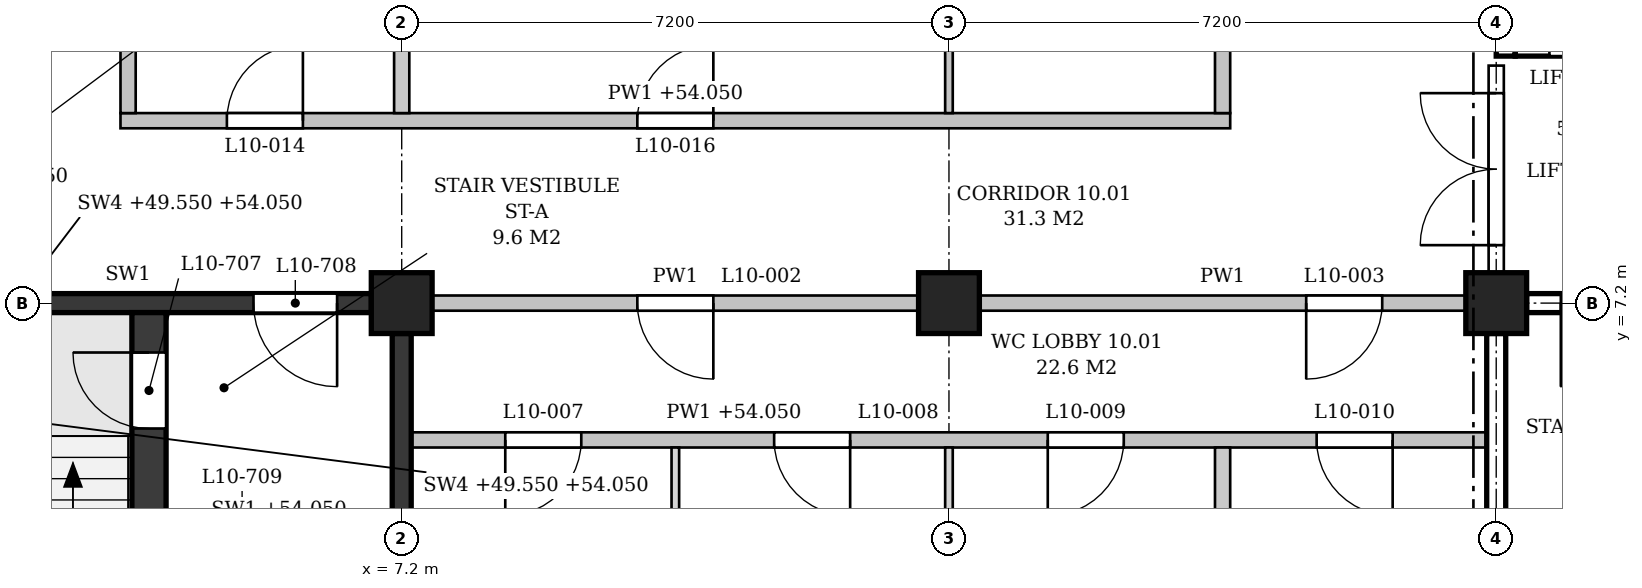
"""IFC4 building model, lengths in metres.
Left out: names, types, materials, properties, quantities, classifications, styles, units other than length and angle.
Written with IfcOpenShell. Run it as: python <this file> out.ifc"""

import sys

from ifc_helpers import new_model, si_unit, direction, frame, frame_2d, origin, origin_2d, place, context, subcontext, project, spatial, polyline, rectangle, outline, extrude, element, fill, save


model = new_model("IFC4")
c1 = context("Model", 3, precision=1e-05, world=origin(), true_north=direction((0.0, 1.0)))
c2 = subcontext(c1, "Body", "Model", "MODEL_VIEW")
j1 = project(units=[si_unit("LENGTHUNIT", "METRE"), si_unit("PLANEANGLEUNIT", "RADIAN")], contexts=[c1])
p1 = place(None, origin())
s1 = spatial("IfcSite", under=j1, at=p1, CompositionType="ELEMENT")
p2 = place(p1, origin())
s2 = spatial("IfcBuilding", under=s1, at=p2, CompositionType="ELEMENT")
p3 = place(p2, frame((0.0, 0.0, 49.8)))
s3 = spatial("IfcBuildingStorey", under=s2, at=p3, CompositionType="ELEMENT", Elevation=49.8)
for number, where, z_axis, x_axis in (
    (1, (7.2, 7.2, 0.0), (0.0, 0.0, 1.0), (1.0, 0.0, 0.0)),
    (2, (14.4, 7.2, 0.0), (0.0, 0.0, 1.0), (1.0, 0.0, 0.0)),
    (3, (21.6, 7.2, 0.0), (0.0, 0.0, 1.0), (1.0, 0.0, 0.0)),
):
    element("IfcColumn", number, at=place(p3, frame(where, z_axis=z_axis, x_axis=x_axis)), inside=s3, PredefinedType="COLUMN", context=c2, shape_type="SweptSolid", body=[
        extrude(rectangle(XDim=0.8, YDim=0.8, at=origin_2d()), origin(), (0.0, 0.0, 1.0), 4.5),
    ])
p4 = place(p3, frame((0.4, 7.2, 0.0), z_axis=(0.0, 0.0, 1.0), x_axis=(1.0, 0.0, 0.0)))
e4 = element("IfcWall", 4, at=p4, inside=s3, PredefinedType="SHEAR", context=c2, shape_type="SweptSolid", body=[
    extrude(rectangle(XDim=6.4, YDim=0.25, at=frame_2d((3.2, 0.0))), origin(), (0.0, 0.0, 1.0), 3.55),
])
p5 = place(p4, frame((4.85, 0.0, 0.0)))
e5 = element("IfcOpeningElement", 5, at=p5, cuts=e4, PredefinedType="OPENING", context=c2, shape_type="SweptSolid", body=[
    extrude(rectangle(XDim=1.1, YDim=2.1, at=frame_2d((0.55, 1.05))), frame((0.0, 0.135, 0.0), z_axis=(0.0, -1.0, 0.0), x_axis=(1.0, 0.0, 0.0)), (0.0, 0.0, 1.0), 0.27),
])
p6 = place(p3, frame((7.2, 0.4, 0.0), z_axis=(0.0, 0.0, 1.0), x_axis=(0.0, 1.0, 0.0)))
e6 = element("IfcWall", 6, at=p6, inside=s3, PredefinedType="SHEAR", context=c2, shape_type="SweptSolid", body=[
    extrude(rectangle(XDim=6.4, YDim=0.25, at=frame_2d((3.2, 0.0))), origin(), (0.0, 0.0, 1.0), 3.55),
])
p7 = place(p3, frame((3.875, 0.15, 0.0), z_axis=(0.0, 0.0, 1.0), x_axis=(0.0, 1.0, 0.0)))
e7 = element("IfcWall", 7, at=p7, inside=s3, PredefinedType="SHEAR", context=c2, shape_type="SweptSolid", body=[
    extrude(rectangle(XDim=6.925, YDim=0.45, at=frame_2d((3.462, 0.0))), origin(), (0.0, 0.0, 1.0), 4.25),
])
p8 = place(p7, frame((5.4, 0.0, 0.0)))
e8 = element("IfcOpeningElement", 8, at=p8, cuts=e7, PredefinedType="OPENING", context=c2, shape_type="SweptSolid", body=[
    extrude(rectangle(XDim=1.0, YDim=2.1, at=frame_2d((0.5, 1.05))), frame((0.0, 0.235, 0.0), z_axis=(0.0, -1.0, 0.0), x_axis=(1.0, 0.0, 0.0)), (0.0, 0.0, 1.0), 0.47),
])
p9 = place(p3, frame((22.0, 7.2, 0.0), z_axis=(0.0, 0.0, 1.0), x_axis=(1.0, 0.0, 0.0)))
e9 = element("IfcWall", 9, at=p9, inside=s3, PredefinedType="SHEAR", context=c2, shape_type="SweptSolid", body=[
    extrude(rectangle(XDim=6.4, YDim=0.25, at=frame_2d((3.2, 0.0))), origin(), (0.0, 0.0, 1.0), 3.55),
])
p10 = place(p9, frame((0.45, 0.0, 0.0)))
e10 = element("IfcOpeningElement", 10, at=p10, cuts=e9, PredefinedType="OPENING", context=c2, shape_type="SweptSolid", body=[
    extrude(rectangle(XDim=1.1, YDim=2.1, at=frame_2d((0.55, 1.05))), frame((0.0, 0.135, 0.0), z_axis=(0.0, -1.0, 0.0), x_axis=(1.0, 0.0, 0.0)), (0.0, 0.0, 1.0), 0.27),
])
p11 = place(p3, frame((21.6, 0.4, 0.0), z_axis=(0.0, 0.0, 1.0), x_axis=(0.0, 1.0, 0.0)))
e11 = element("IfcWall", 11, at=p11, inside=s3, PredefinedType="SHEAR", context=c2, shape_type="SweptSolid", body=[
    extrude(rectangle(XDim=6.4, YDim=0.25, at=frame_2d((3.2, 0.0))), origin(), (0.0, 0.0, 1.0), 3.55),
])
p12 = place(p3, frame((21.725, 10.45, -0.25), z_axis=(0.0, 0.0, 1.0), x_axis=(0.0, 1.0, 0.0)))
e12 = element("IfcWall", 12, at=p12, inside=s3, PredefinedType="SHEAR", context=c2, shape_type="SweptSolid", body=[
    extrude(rectangle(XDim=3.55, YDim=0.25, at=frame_2d((1.775, 0.0))), origin(), (0.0, 0.0, 1.0), 3.8),
])
p13 = place(p3, frame((21.85, 10.575, -0.25), z_axis=(0.0, 0.0, 1.0), x_axis=(1.0, 0.0, 0.0)))
e13 = element("IfcWall", 13, at=p13, inside=s3, PredefinedType="SHEAR", context=c2, shape_type="SweptSolid", body=[
    extrude(rectangle(XDim=2.0, YDim=0.25, at=frame_2d((1.0, 0.0))), origin(), (0.0, 0.0, 1.0), 4.5),
])
p14 = place(p13, frame((0.45, 0.0, 0.25)))
e14 = element("IfcOpeningElement", 14, at=p14, cuts=e13, PredefinedType="OPENING", context=c2, shape_type="SweptSolid", body=[
    extrude(rectangle(XDim=1.1, YDim=2.1, at=frame_2d((0.55, 1.05))), frame((0.0, 0.135, 0.0), z_axis=(0.0, -1.0, 0.0), x_axis=(1.0, 0.0, 0.0)), (0.0, 0.0, 1.0), 0.27),
])
p15 = place(p3, frame((7.325, 5.4, 0.0), z_axis=(0.0, 0.0, 1.0), x_axis=(1.0, 0.0, 0.0)))
e15 = element("IfcWall", 15, at=p15, inside=s3, PredefinedType="PARTITIONING", context=c2, shape_type="SweptSolid", body=[
    extrude(outline(polyline([(0.0, 0.0), (14.15, 0.0), (14.15, 3.55), (14.05, 3.55), (14.05, 4.25), (7.3, 4.25), (7.3, 3.55), (6.85, 3.55), (6.85, 4.25), (0.1, 4.25), (0.1, 3.55), (0.0, 3.55), (0.0, 0.0)])), frame((0.0, 0.1, 0.0), z_axis=(0.0, -1.0, 0.0), x_axis=(1.0, 0.0, 0.0)), (0.0, 0.0, 1.0), 0.2),
])
p16 = place(p15, frame((1.238, 0.0, 0.0)))
e16 = element("IfcOpeningElement", 16, at=p16, cuts=e15, PredefinedType="OPENING", context=c2, shape_type="SweptSolid", body=[
    extrude(rectangle(XDim=1.0, YDim=2.1, at=frame_2d((0.5, 1.05))), frame((0.0, 0.11, 0.0), z_axis=(0.0, -1.0, 0.0), x_axis=(1.0, 0.0, 0.0)), (0.0, 0.0, 1.0), 0.22),
])
p17 = place(p15, frame((4.775, 0.0, 0.0)))
e17 = element("IfcOpeningElement", 17, at=p17, cuts=e15, PredefinedType="OPENING", context=c2, shape_type="SweptSolid", body=[
    extrude(rectangle(XDim=1.0, YDim=2.1, at=frame_2d((0.5, 1.05))), frame((0.0, 0.11, 0.0), z_axis=(0.0, -1.0, 0.0), x_axis=(1.0, 0.0, 0.0)), (0.0, 0.0, 1.0), 0.22),
])
p18 = place(p15, frame((8.375, 0.0, 0.0)))
e18 = element("IfcOpeningElement", 18, at=p18, cuts=e15, PredefinedType="OPENING", context=c2, shape_type="SweptSolid", body=[
    extrude(rectangle(XDim=1.0, YDim=2.1, at=frame_2d((0.5, 1.05))), frame((0.0, 0.11, 0.0), z_axis=(0.0, -1.0, 0.0), x_axis=(1.0, 0.0, 0.0)), (0.0, 0.0, 1.0), 0.22),
])
p19 = place(p15, frame((11.913, 0.0, 0.0)))
e19 = element("IfcOpeningElement", 19, at=p19, cuts=e15, PredefinedType="OPENING", context=c2, shape_type="SweptSolid", body=[
    extrude(rectangle(XDim=1.0, YDim=2.1, at=frame_2d((0.5, 1.05))), frame((0.0, 0.11, 0.0), z_axis=(0.0, -1.0, 0.0), x_axis=(1.0, 0.0, 0.0)), (0.0, 0.0, 1.0), 0.22),
])
p20 = place(p3, frame((7.6, 7.2, 0.0), z_axis=(0.0, 0.0, 1.0), x_axis=(1.0, 0.0, 0.0)))
e20 = element("IfcWall", 20, at=p20, inside=s3, PredefinedType="PARTITIONING", context=c2, shape_type="SweptSolid", body=[
    extrude(rectangle(XDim=6.4, YDim=0.2, at=frame_2d((3.2, 0.0))), origin(), (0.0, 0.0, 1.0), 3.55),
])
p21 = place(p20, frame((2.7, 0.0, 0.0)))
e21 = element("IfcOpeningElement", 21, at=p21, cuts=e20, PredefinedType="OPENING", context=c2, shape_type="SweptSolid", body=[
    extrude(rectangle(XDim=1.0, YDim=2.1, at=frame_2d((0.5, 1.05))), frame((0.0, 0.11, 0.0), z_axis=(0.0, -1.0, 0.0), x_axis=(1.0, 0.0, 0.0)), (0.0, 0.0, 1.0), 0.22),
])
p22 = place(p3, frame((14.8, 7.2, 0.0), z_axis=(0.0, 0.0, 1.0), x_axis=(1.0, 0.0, 0.0)))
e22 = element("IfcWall", 22, at=p22, inside=s3, PredefinedType="PARTITIONING", context=c2, shape_type="SweptSolid", body=[
    extrude(rectangle(XDim=6.4, YDim=0.2, at=frame_2d((3.2, 0.0))), origin(), (0.0, 0.0, 1.0), 3.55),
])
p23 = place(p22, frame((4.3, 0.0, 0.0)))
e23 = element("IfcOpeningElement", 23, at=p23, cuts=e22, PredefinedType="OPENING", context=c2, shape_type="SweptSolid", body=[
    extrude(rectangle(XDim=1.0, YDim=2.1, at=frame_2d((0.5, 1.05))), frame((0.0, 0.11, 0.0), z_axis=(0.0, -1.0, 0.0), x_axis=(1.0, 0.0, 0.0)), (0.0, 0.0, 1.0), 0.22),
])
p24 = place(p3, frame((3.5, 9.6, 0.0), z_axis=(0.0, 0.0, 1.0), x_axis=(1.0, 0.0, 0.0)))
e24 = element("IfcWall", 24, at=p24, inside=s3, PredefinedType="PARTITIONING", context=c2, shape_type="SweptSolid", body=[
    extrude(outline(polyline([(0.0, 0.0), (14.6, 0.0), (14.6, 4.25), (11.125, 4.25), (11.125, 3.55), (10.675, 3.55), (10.675, 4.25), (3.925, 4.25), (3.925, 3.55), (3.475, 3.55), (3.475, 4.25), (0.0, 4.25), (0.0, 0.0)])), frame((0.0, 0.1, 0.0), z_axis=(0.0, -1.0, 0.0), x_axis=(1.0, 0.0, 0.0)), (0.0, 0.0, 1.0), 0.2),
])
p25 = place(p24, frame((1.4, 0.0, 0.0)))
e25 = element("IfcOpeningElement", 25, at=p25, cuts=e24, PredefinedType="OPENING", context=c2, shape_type="SweptSolid", body=[
    extrude(rectangle(XDim=1.0, YDim=2.1, at=frame_2d((0.5, 1.05))), frame((0.0, 0.11, 0.0), z_axis=(0.0, -1.0, 0.0), x_axis=(1.0, 0.0, 0.0)), (0.0, 0.0, 1.0), 0.22),
])
p26 = place(p24, frame((6.8, 0.0, 0.0)))
e26 = element("IfcOpeningElement", 26, at=p26, cuts=e24, PredefinedType="OPENING", context=c2, shape_type="SweptSolid", body=[
    extrude(rectangle(XDim=1.0, YDim=2.1, at=frame_2d((0.5, 1.05))), frame((0.0, 0.11, 0.0), z_axis=(0.0, -1.0, 0.0), x_axis=(1.0, 0.0, 0.0)), (0.0, 0.0, 1.0), 0.22),
])
p27 = place(p3, frame((3.6, 9.7, 0.0), z_axis=(0.0, 0.0, 1.0), x_axis=(0.0, 1.0, 0.0)))
e27 = element("IfcWall", 27, at=p27, inside=s3, PredefinedType="PARTITIONING", context=c2, shape_type="SweptSolid", body=[
    extrude(rectangle(XDim=1.1, YDim=0.2, at=frame_2d((0.55, 0.0))), origin(), (0.0, 0.0, 1.0), 4.25),
])
p28 = place(p3, frame((7.2, 9.7, 0.0), z_axis=(0.0, 0.0, 1.0), x_axis=(0.0, 1.0, 0.0)))
e28 = element("IfcWall", 28, at=p28, inside=s3, PredefinedType="PARTITIONING", context=c2, shape_type="SweptSolid", body=[
    extrude(rectangle(XDim=4.3, YDim=0.2, at=frame_2d((2.15, 0.0))), origin(), (0.0, 0.0, 1.0), 3.55),
])
p29 = place(p3, frame((10.8, 0.15, 0.0), z_axis=(0.0, 0.0, 1.0), x_axis=(0.0, 1.0, 0.0)))
e29 = element("IfcWall", 29, at=p29, inside=s3, PredefinedType="PARTITIONING", context=c2, shape_type="SweptSolid", body=[
    extrude(rectangle(XDim=5.15, YDim=0.1, at=frame_2d((2.575, 0.0))), origin(), (0.0, 0.0, 1.0), 3.55),
])
p30 = place(p3, frame((14.4, 0.4, 0.0), z_axis=(0.0, 0.0, 1.0), x_axis=(0.0, 1.0, 0.0)))
e30 = element("IfcWall", 30, at=p30, inside=s3, PredefinedType="PARTITIONING", context=c2, shape_type="SweptSolid", body=[
    extrude(rectangle(XDim=4.9, YDim=0.1, at=frame_2d((2.45, 0.0))), origin(), (0.0, 0.0, 1.0), 3.55),
])
p31 = place(p3, frame((14.4, 9.7, 0.0), z_axis=(0.0, 0.0, 1.0), x_axis=(0.0, 1.0, 0.0)))
e31 = element("IfcWall", 31, at=p31, inside=s3, PredefinedType="PARTITIONING", context=c2, shape_type="SweptSolid", body=[
    extrude(rectangle(XDim=3.5, YDim=0.1, at=frame_2d((1.75, 0.0))), origin(), (0.0, 0.0, 1.0), 3.55),
])
p32 = place(p3, frame((18.0, 0.15, 0.0), z_axis=(0.0, 0.0, 1.0), x_axis=(0.0, 1.0, 0.0)))
e32 = element("IfcWall", 32, at=p32, inside=s3, PredefinedType="PARTITIONING", context=c2, shape_type="SweptSolid", body=[
    extrude(outline(polyline([(0.0, 0.0), (5.15, 0.0), (5.15, 4.25), (0.05, 4.25), (0.05, 3.65), (0.0, 3.65), (0.0, 0.0)])), frame((0.0, 0.1, 0.0), z_axis=(0.0, -1.0, 0.0), x_axis=(1.0, 0.0, 0.0)), (0.0, 0.0, 1.0), 0.2),
])
p33 = place(p3, frame((18.0, 9.7, 0.0), z_axis=(0.0, 0.0, 1.0), x_axis=(0.0, 1.0, 0.0)))
e33 = element("IfcWall", 33, at=p33, inside=s3, PredefinedType="PARTITIONING", context=c2, shape_type="SweptSolid", body=[
    extrude(outline(polyline([(0.0, 0.0), (7.1, 0.0), (7.1, 4.25), (4.925, 4.25), (4.925, 3.55), (4.475, 3.55), (4.475, 4.25), (0.0, 4.25), (0.0, 0.0)])), frame((0.0, 0.1, 0.0), z_axis=(0.0, -1.0, 0.0), x_axis=(1.0, 0.0, 0.0)), (0.0, 0.0, 1.0), 0.2),
])
p34 = place(p33, frame((3.05, 0.0, 0.0)))
e34 = element("IfcOpeningElement", 34, at=p34, cuts=e33, PredefinedType="OPENING", context=c2, shape_type="SweptSolid", body=[
    extrude(rectangle(XDim=1.0, YDim=2.1, at=frame_2d((0.5, 1.05))), frame((0.0, 0.11, 0.0), z_axis=(0.0, -1.0, 0.0), x_axis=(1.0, 0.0, 0.0)), (0.0, 0.0, 1.0), 0.22),
])
p35 = place(p3, frame((21.6, 7.6, 0.0), z_axis=(0.0, 0.0, 1.0), x_axis=(0.0, 1.0, 0.0)))
e35 = element("IfcWall", 35, at=p35, inside=s3, PredefinedType="PARTITIONING", context=c2, shape_type="SweptSolid", body=[
    extrude(rectangle(XDim=2.725, YDim=0.2, at=frame_2d((1.362, 0.0))), origin(), (0.0, 0.0, 1.0), 3.55),
])
p36 = place(p35, frame((0.362, 0.0, 0.0)))
e36 = element("IfcOpeningElement", 36, at=p36, cuts=e35, PredefinedType="OPENING", context=c2, shape_type="SweptSolid", body=[
    extrude(rectangle(XDim=2.0, YDim=2.4, at=frame_2d((1.0, 1.2))), frame((0.0, 0.11, 0.0), z_axis=(0.0, -1.0, 0.0), x_axis=(1.0, 0.0, 0.0)), (0.0, 0.0, 1.0), 0.22),
])
p37 = place(p8, origin())
e37 = element("IfcDoor", 37, at=p37, inside=s3, OperationType="SINGLE_SWING_RIGHT", PredefinedType="DOOR", context=c2, shape_type="SweptSolid", body=[
    extrude(rectangle(XDim=1.0, YDim=2.1, at=frame_2d((0.5, 1.05))), frame((0.0, 0.025, 0.0), z_axis=(0.0, -1.0, 0.0), x_axis=(1.0, 0.0, 0.0)), (0.0, 0.0, 1.0), 0.05),
])
fill(e8, e37)
p38 = place(p5, frame((1.1, 0.0, 0.0), z_axis=(0.0, 0.0, 1.0), x_axis=(-1.0, 0.0, 0.0)))
e38 = element("IfcDoor", 38, at=p38, inside=s3, OperationType="SINGLE_SWING_LEFT", PredefinedType="DOOR", context=c2, shape_type="SweptSolid", body=[
    extrude(rectangle(XDim=1.1, YDim=2.1, at=frame_2d((0.55, 1.05))), frame((0.0, 0.025, 0.0), z_axis=(0.0, -1.0, 0.0), x_axis=(1.0, 0.0, 0.0)), (0.0, 0.0, 1.0), 0.05),
])
fill(e5, e38)
p39 = place(p10, frame((1.1, 0.0, 0.0), z_axis=(0.0, 0.0, 1.0), x_axis=(-1.0, 0.0, 0.0)))
e39 = element("IfcDoor", 39, at=p39, inside=s3, OperationType="SINGLE_SWING_RIGHT", PredefinedType="DOOR", context=c2, shape_type="SweptSolid", body=[
    extrude(rectangle(XDim=1.1, YDim=2.1, at=frame_2d((0.55, 1.05))), frame((0.0, 0.025, 0.0), z_axis=(0.0, -1.0, 0.0), x_axis=(1.0, 0.0, 0.0)), (0.0, 0.0, 1.0), 0.05),
])
fill(e10, e39)
p40 = place(p36, origin())
e40 = element("IfcDoor", 40, at=p40, inside=s3, OperationType="DOUBLE_DOOR_SINGLE_SWING", PredefinedType="DOOR", context=c2, shape_type="SweptSolid", body=[
    extrude(rectangle(XDim=2.0, YDim=2.4, at=frame_2d((1.0, 1.2))), frame((0.0, 0.025, 0.0), z_axis=(0.0, -1.0, 0.0), x_axis=(1.0, 0.0, 0.0)), (0.0, 0.0, 1.0), 0.05),
])
fill(e36, e40)
p41 = place(p21, frame((1.0, 0.0, 0.0), z_axis=(0.0, 0.0, 1.0), x_axis=(-1.0, 0.0, 0.0)))
e41 = element("IfcDoor", 41, at=p41, inside=s3, OperationType="SINGLE_SWING_LEFT", PredefinedType="DOOR", context=c2, shape_type="SweptSolid", body=[
    extrude(rectangle(XDim=1.0, YDim=2.1, at=frame_2d((0.5, 1.05))), frame((0.0, 0.025, 0.0), z_axis=(0.0, -1.0, 0.0), x_axis=(1.0, 0.0, 0.0)), (0.0, 0.0, 1.0), 0.05),
])
fill(e21, e41)
p42 = place(p23, frame((1.0, 0.0, 0.0), z_axis=(0.0, 0.0, 1.0), x_axis=(-1.0, 0.0, 0.0)))
e42 = element("IfcDoor", 42, at=p42, inside=s3, OperationType="SINGLE_SWING_RIGHT", PredefinedType="DOOR", context=c2, shape_type="SweptSolid", body=[
    extrude(rectangle(XDim=1.0, YDim=2.1, at=frame_2d((0.5, 1.05))), frame((0.0, 0.025, 0.0), z_axis=(0.0, -1.0, 0.0), x_axis=(1.0, 0.0, 0.0)), (0.0, 0.0, 1.0), 0.05),
])
fill(e23, e42)
p43 = place(p16, frame((1.0, 0.0, 0.0), z_axis=(0.0, 0.0, 1.0), x_axis=(-1.0, 0.0, 0.0)))
e43 = element("IfcDoor", 43, at=p43, inside=s3, OperationType="SINGLE_SWING_RIGHT", PredefinedType="DOOR", context=c2, shape_type="SweptSolid", body=[
    extrude(rectangle(XDim=1.0, YDim=2.1, at=frame_2d((0.5, 1.05))), frame((0.0, 0.025, 0.0), z_axis=(0.0, -1.0, 0.0), x_axis=(1.0, 0.0, 0.0)), (0.0, 0.0, 1.0), 0.05),
])
fill(e16, e43)
p44 = place(p17, frame((1.0, 0.0, 0.0), z_axis=(0.0, 0.0, 1.0), x_axis=(-1.0, 0.0, 0.0)))
e44 = element("IfcDoor", 44, at=p44, inside=s3, OperationType="SINGLE_SWING_LEFT", PredefinedType="DOOR", context=c2, shape_type="SweptSolid", body=[
    extrude(rectangle(XDim=1.0, YDim=2.1, at=frame_2d((0.5, 1.05))), frame((0.0, 0.025, 0.0), z_axis=(0.0, -1.0, 0.0), x_axis=(1.0, 0.0, 0.0)), (0.0, 0.0, 1.0), 0.05),
])
fill(e17, e44)
p45 = place(p18, frame((1.0, 0.0, 0.0), z_axis=(0.0, 0.0, 1.0), x_axis=(-1.0, 0.0, 0.0)))
e45 = element("IfcDoor", 45, at=p45, inside=s3, OperationType="SINGLE_SWING_RIGHT", PredefinedType="DOOR", context=c2, shape_type="SweptSolid", body=[
    extrude(rectangle(XDim=1.0, YDim=2.1, at=frame_2d((0.5, 1.05))), frame((0.0, 0.025, 0.0), z_axis=(0.0, -1.0, 0.0), x_axis=(1.0, 0.0, 0.0)), (0.0, 0.0, 1.0), 0.05),
])
fill(e18, e45)
p46 = place(p19, frame((1.0, 0.0, 0.0), z_axis=(0.0, 0.0, 1.0), x_axis=(-1.0, 0.0, 0.0)))
e46 = element("IfcDoor", 46, at=p46, inside=s3, OperationType="SINGLE_SWING_LEFT", PredefinedType="DOOR", context=c2, shape_type="SweptSolid", body=[
    extrude(rectangle(XDim=1.0, YDim=2.1, at=frame_2d((0.5, 1.05))), frame((0.0, 0.025, 0.0), z_axis=(0.0, -1.0, 0.0), x_axis=(1.0, 0.0, 0.0)), (0.0, 0.0, 1.0), 0.05),
])
fill(e19, e46)
p47 = place(p25, origin())
e47 = element("IfcDoor", 47, at=p47, inside=s3, OperationType="SINGLE_SWING_RIGHT", PredefinedType="DOOR", context=c2, shape_type="SweptSolid", body=[
    extrude(rectangle(XDim=1.0, YDim=2.1, at=frame_2d((0.5, 1.05))), frame((0.0, 0.025, 0.0), z_axis=(0.0, -1.0, 0.0), x_axis=(1.0, 0.0, 0.0)), (0.0, 0.0, 1.0), 0.05),
])
fill(e25, e47)
p48 = place(p26, origin())
e48 = element("IfcDoor", 48, at=p48, inside=s3, OperationType="SINGLE_SWING_RIGHT", PredefinedType="DOOR", context=c2, shape_type="SweptSolid", body=[
    extrude(rectangle(XDim=1.0, YDim=2.1, at=frame_2d((0.5, 1.05))), frame((0.0, 0.025, 0.0), z_axis=(0.0, -1.0, 0.0), x_axis=(1.0, 0.0, 0.0)), (0.0, 0.0, 1.0), 0.05),
])
fill(e26, e48)
save(model, sys.argv[1])
